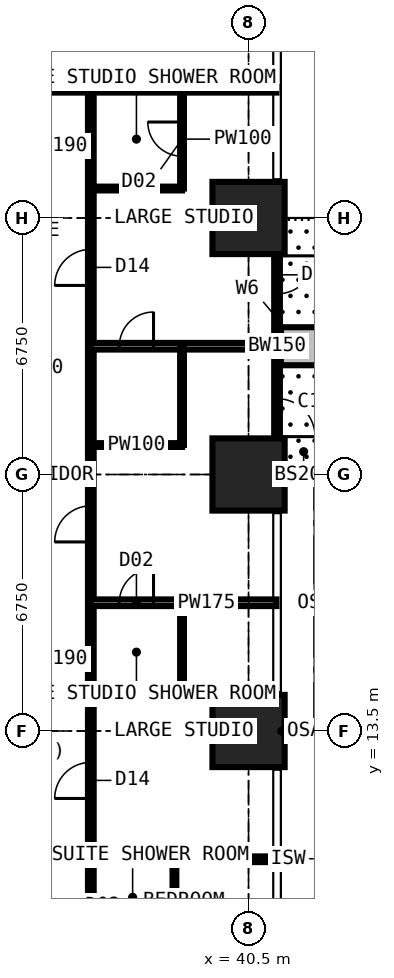
"""IFC4 building model, lengths in metres.
Left out: names, types, materials, properties, quantities, classifications, styles, units other than length and angle.
Written with IfcOpenShell. Run it as: python <this file> out.ifc"""

import sys

from ifc_helpers import new_model, si_unit, direction, frame, frame_2d, origin, origin_2d, place, context, subcontext, project, spatial, rectangle, extrude, element, fill, save


model = new_model("IFC4")
c1 = context("Model", 3, precision=1e-05, world=origin(), true_north=direction((0.0, 1.0)))
c2 = subcontext(c1, "Body", "Model", "MODEL_VIEW")
j1 = project(units=[si_unit("LENGTHUNIT", "METRE"), si_unit("PLANEANGLEUNIT", "RADIAN")], contexts=[c1])
p1 = place(None, origin())
s1 = spatial("IfcSite", under=j1, at=p1, CompositionType="ELEMENT")
p2 = place(p1, origin())
s2 = spatial("IfcBuilding", under=s1, at=p2, CompositionType="ELEMENT")
p3 = place(p2, frame((0.0, 0.0, 43.2)))
s3 = spatial("IfcBuildingStorey", under=s2, at=p3, CompositionType="ELEMENT", Elevation=43.2)
for number, where, z_axis, x_axis in (
    (1, (40.5, 13.5, 0.0), (0.0, 0.0, 1.0), (1.0, 0.0, 0.0)),
    (2, (40.5, 20.25, 0.0), (0.0, 0.0, 1.0), (1.0, 0.0, 0.0)),
    (3, (40.5, 27.0, 0.0), (0.0, 0.0, 1.0), (1.0, 0.0, 0.0)),
):
    element("IfcColumn", number, at=place(p3, frame(where, z_axis=z_axis, x_axis=x_axis)), inside=s3, PredefinedType="COLUMN", context=c2, shape_type="SweptSolid", body=[
        extrude(rectangle(XDim=1.9, YDim=1.9, at=origin_2d()), origin(), (0.0, 0.0, 1.0), 3.6),
    ])
p4 = place(p3, frame((41.25, 27.0, 0.0), z_axis=(0.0, 0.0, 1.0), x_axis=(0.0, -1.0, 0.0)))
e4 = element("IfcWall", 4, at=p4, inside=s3, PredefinedType="SOLIDWALL", context=c2, shape_type="SweptSolid", body=[
    extrude(rectangle(XDim=6.75, YDim=0.15, at=frame_2d((3.375, 0.0))), origin(), (0.0, 0.0, 1.0), 3.375),
])
p5 = place(p4, frame((0.996, 0.0, 0.0)))
e5 = element("IfcOpeningElement", 5, at=p5, cuts=e4, PredefinedType="OPENING", context=c2, shape_type="SweptSolid", body=[
    extrude(rectangle(XDim=1.0, YDim=2.2, at=frame_2d((0.5, 1.1))), frame((0.0, 0.085, 0.0), z_axis=(0.0, -1.0, 0.0), x_axis=(1.0, 0.0, 0.0)), (0.0, 0.0, 1.0), 0.17),
])
p6 = place(p4, frame((2.042, 0.0, 0.9)))
e6 = element("IfcOpeningElement", 6, at=p6, cuts=e4, PredefinedType="OPENING", context=c2, shape_type="SweptSolid", body=[
    extrude(rectangle(XDim=1.2, YDim=1.8, at=frame_2d((0.6, 0.9))), frame((0.0, 0.085, 0.0), z_axis=(0.0, -1.0, 0.0), x_axis=(1.0, 0.0, 0.0)), (0.0, 0.0, 1.0), 0.17),
])
p7 = place(p4, frame((4.754, 0.0, 0.0)))
e7 = element("IfcOpeningElement", 7, at=p7, cuts=e4, PredefinedType="OPENING", context=c2, shape_type="SweptSolid", body=[
    extrude(rectangle(XDim=1.0, YDim=2.2, at=frame_2d((0.5, 1.1))), frame((0.0, 0.085, 0.0), z_axis=(0.0, -1.0, 0.0), x_axis=(1.0, 0.0, 0.0)), (0.0, 0.0, 1.0), 0.17),
])
p8 = place(p4, frame((3.508, 0.0, 0.9)))
e8 = element("IfcOpeningElement", 8, at=p8, cuts=e4, PredefinedType="OPENING", context=c2, shape_type="SweptSolid", body=[
    extrude(rectangle(XDim=1.2, YDim=1.8, at=frame_2d((0.6, 0.9))), frame((0.0, 0.085, 0.0), z_axis=(0.0, -1.0, 0.0), x_axis=(1.0, 0.0, 0.0)), (0.0, 0.0, 1.0), 0.17),
])
p9 = place(p3, frame((41.35, 23.625, 0.0), z_axis=(0.0, 0.0, 1.0), x_axis=(1.0, 0.0, 0.0)))
e9 = element("IfcWall", 9, at=p9, inside=s3, PredefinedType="USERDEFINED", context=c2, shape_type="SweptSolid", body=[
    extrude(rectangle(XDim=2.2, YDim=1.0, at=frame_2d((1.1, 0.0))), origin(), (0.0, 0.0, 1.0), 0.9),
])
p10 = place(p3, frame((30.375, 10.125, 0.0), z_axis=(0.0, 0.0, 1.0), x_axis=(1.0, 0.0, 0.0)))
e10 = element("IfcWall", 10, at=p10, inside=s3, PredefinedType="PARTITIONING", context=c2, shape_type="SweptSolid", body=[
    extrude(rectangle(XDim=10.859, YDim=0.15, at=frame_2d((5.429, 0.0))), origin(), (0.0, 0.0, 1.0), 3.375),
])
p11 = place(p10, frame((2.5, 0.0, 0.0)))
e11 = element("IfcOpeningElement", 11, at=p11, cuts=e10, PredefinedType="OPENING", context=c2, shape_type="SweptSolid", body=[
    extrude(rectangle(XDim=1.0, YDim=2.2, at=frame_2d((0.5, 1.1))), frame((0.0, 0.085, 0.0), z_axis=(0.0, -1.0, 0.0), x_axis=(1.0, 0.0, 0.0)), (0.0, 0.0, 1.0), 0.17),
])
p12 = place(p3, frame((30.375, 30.375, 0.0), z_axis=(0.0, 0.0, 1.0), x_axis=(1.0, 0.0, 0.0)))
e12 = element("IfcWall", 12, at=p12, inside=s3, PredefinedType="PARTITIONING", context=c2, shape_type="SweptSolid", body=[
    extrude(rectangle(XDim=10.859, YDim=0.15, at=frame_2d((5.429, 0.0))), origin(), (0.0, 0.0, 1.0), 3.375),
])
p13 = place(p3, frame((36.35, 6.75, 0.0), z_axis=(0.0, 0.0, 1.0), x_axis=(0.0, 1.0, 0.0)))
e13 = element("IfcWall", 13, at=p13, inside=s3, PredefinedType="PARTITIONING", context=c2, shape_type="SweptSolid", body=[
    extrude(rectangle(XDim=23.625, YDim=0.15, at=frame_2d((11.812, 0.0))), origin(), (0.0, 0.0, 1.0), 3.375),
])
p14 = place(p13, frame((0.2, 0.0, 0.0)))
e14 = element("IfcOpeningElement", 14, at=p14, cuts=e13, PredefinedType="OPENING", context=c2, shape_type="SweptSolid", body=[
    extrude(rectangle(XDim=0.95, YDim=2.2, at=frame_2d((0.475, 1.1))), frame((0.0, 0.085, 0.0), z_axis=(0.0, -1.0, 0.0), x_axis=(1.0, 0.0, 0.0)), (0.0, 0.0, 1.0), 0.17),
])
p15 = place(p13, frame((18.475, 0.0, 0.0)))
e15 = element("IfcOpeningElement", 15, at=p15, cuts=e13, PredefinedType="OPENING", context=c2, shape_type="SweptSolid", body=[
    extrude(rectangle(XDim=0.95, YDim=2.2, at=frame_2d((0.475, 1.1))), frame((0.0, 0.085, 0.0), z_axis=(0.0, -1.0, 0.0), x_axis=(1.0, 0.0, 0.0)), (0.0, 0.0, 1.0), 0.17),
])
p16 = place(p13, frame((11.725, 0.0, 0.0)))
e16 = element("IfcOpeningElement", 16, at=p16, cuts=e13, PredefinedType="OPENING", context=c2, shape_type="SweptSolid", body=[
    extrude(rectangle(XDim=0.95, YDim=2.2, at=frame_2d((0.475, 1.1))), frame((0.0, 0.085, 0.0), z_axis=(0.0, -1.0, 0.0), x_axis=(1.0, 0.0, 0.0)), (0.0, 0.0, 1.0), 0.17),
])
p17 = place(p13, frame((4.975, 0.0, 0.0)))
e17 = element("IfcOpeningElement", 17, at=p17, cuts=e13, PredefinedType="OPENING", context=c2, shape_type="SweptSolid", body=[
    extrude(rectangle(XDim=0.95, YDim=2.2, at=frame_2d((0.475, 1.1))), frame((0.0, 0.085, 0.0), z_axis=(0.0, -1.0, 0.0), x_axis=(1.0, 0.0, 0.0)), (0.0, 0.0, 1.0), 0.17),
])
p18 = place(p3, frame((36.35, 14.275, 0.0), z_axis=(0.0, 0.0, 1.0), x_axis=(1.0, 0.0, 0.0)))
e18 = element("IfcWall", 18, at=p18, inside=s3, PredefinedType="PARTITIONING", context=c2, shape_type="SweptSolid", body=[
    extrude(rectangle(XDim=2.4, YDim=0.1, at=frame_2d((1.2, 0.0))), origin(), (0.0, 0.0, 1.0), 3.375),
])
p19 = place(p3, frame((36.35, 16.875, 0.0), z_axis=(0.0, 0.0, 1.0), x_axis=(1.0, 0.0, 0.0)))
e19 = element("IfcWall", 19, at=p19, inside=s3, PredefinedType="PARTITIONING", context=c2, shape_type="SweptSolid", body=[
    extrude(rectangle(XDim=4.884, YDim=0.175, at=frame_2d((2.442, 0.0))), origin(), (0.0, 0.0, 1.0), 3.375),
])
p20 = place(p19, frame((0.75, 0.0, 0.0)))
e20 = element("IfcOpeningElement", 20, at=p20, cuts=e19, PredefinedType="OPENING", context=c2, shape_type="SweptSolid", body=[
    extrude(rectangle(XDim=0.9, YDim=2.2, at=frame_2d((0.45, 1.1))), frame((0.0, 0.097, 0.0), z_axis=(0.0, -1.0, 0.0), x_axis=(1.0, 0.0, 0.0)), (0.0, 0.0, 1.0), 0.195),
])
p21 = place(p3, frame((36.35, 21.025, 0.0), z_axis=(0.0, 0.0, 1.0), x_axis=(1.0, 0.0, 0.0)))
e21 = element("IfcWall", 21, at=p21, inside=s3, PredefinedType="PARTITIONING", context=c2, shape_type="SweptSolid", body=[
    extrude(rectangle(XDim=2.4, YDim=0.1, at=frame_2d((1.2, 0.0))), origin(), (0.0, 0.0, 1.0), 3.375),
])
p22 = place(p3, frame((36.35, 23.625, 0.0), z_axis=(0.0, 0.0, 1.0), x_axis=(1.0, 0.0, 0.0)))
e22 = element("IfcWall", 22, at=p22, inside=s3, PredefinedType="PARTITIONING", context=c2, shape_type="SweptSolid", body=[
    extrude(rectangle(XDim=4.884, YDim=0.175, at=frame_2d((2.442, 0.0))), origin(), (0.0, 0.0, 1.0), 3.375),
])
p23 = place(p22, frame((0.75, 0.0, 0.0)))
e23 = element("IfcOpeningElement", 23, at=p23, cuts=e22, PredefinedType="OPENING", context=c2, shape_type="SweptSolid", body=[
    extrude(rectangle(XDim=0.9, YDim=2.2, at=frame_2d((0.45, 1.1))), frame((0.0, 0.097, 0.0), z_axis=(0.0, -1.0, 0.0), x_axis=(1.0, 0.0, 0.0)), (0.0, 0.0, 1.0), 0.195),
])
p24 = place(p3, frame((36.35, 27.775, 0.0), z_axis=(0.0, 0.0, 1.0), x_axis=(1.0, 0.0, 0.0)))
e24 = element("IfcWall", 24, at=p24, inside=s3, PredefinedType="PARTITIONING", context=c2, shape_type="SweptSolid", body=[
    extrude(rectangle(XDim=2.4, YDim=0.1, at=frame_2d((1.2, 0.0))), origin(), (0.0, 0.0, 1.0), 3.375),
])
p25 = place(p3, frame((38.55, 8.125, 0.0), z_axis=(0.0, 0.0, 1.0), x_axis=(0.0, 1.0, 0.0)))
e25 = element("IfcWall", 25, at=p25, inside=s3, PredefinedType="PARTITIONING", context=c2, shape_type="SweptSolid", body=[
    extrude(rectangle(XDim=2.0, YDim=0.1, at=frame_2d((1.0, 0.0))), origin(), (0.0, 0.0, 1.0), 3.375),
])
for number, where, z_axis, x_axis in (
    (26, (38.75, 14.275, 0.0), (0.0, 0.0, 1.0), (0.0, 1.0, 0.0)),
    (27, (38.75, 21.025, 0.0), (0.0, 0.0, 1.0), (0.0, 1.0, 0.0)),
):
    element("IfcWall", number, at=place(p3, frame(where, z_axis=z_axis, x_axis=x_axis)), inside=s3, PredefinedType="PARTITIONING", context=c2, shape_type="SweptSolid", body=[
        extrude(rectangle(XDim=2.6, YDim=0.1, at=frame_2d((1.3, 0.0))), origin(), (0.0, 0.0, 1.0), 3.375),
    ])
p26 = place(p3, frame((38.75, 27.775, 0.0), z_axis=(0.0, 0.0, 1.0), x_axis=(0.0, 1.0, 0.0)))
e28 = element("IfcWall", 28, at=p26, inside=s3, PredefinedType="PARTITIONING", context=c2, shape_type="SweptSolid", body=[
    extrude(rectangle(XDim=2.6, YDim=0.1, at=frame_2d((1.3, 0.0))), origin(), (0.0, 0.0, 1.0), 3.375),
])
p27 = place(p26, frame((0.85, 0.0, 0.0)))
e29 = element("IfcOpeningElement", 29, at=p27, cuts=e28, PredefinedType="OPENING", context=c2, shape_type="SweptSolid", body=[
    extrude(rectangle(XDim=0.9, YDim=2.2, at=frame_2d((0.45, 1.1))), frame((0.0, 0.06, 0.0), z_axis=(0.0, -1.0, 0.0), x_axis=(1.0, 0.0, 0.0)), (0.0, 0.0, 1.0), 0.12),
])
p28 = place(p5, origin())
e30 = element("IfcDoor", 30, at=p28, inside=s3, OperationType="SINGLE_SWING_LEFT", PredefinedType="DOOR", context=c2, shape_type="SweptSolid", body=[
    extrude(rectangle(XDim=1.0, YDim=2.2, at=frame_2d((0.5, 1.1))), frame((0.0, 0.025, 0.0), z_axis=(0.0, -1.0, 0.0), x_axis=(1.0, 0.0, 0.0)), (0.0, 0.0, 1.0), 0.05),
])
fill(e5, e30)
p29 = place(p6, origin())
e31 = element("IfcWindow", 31, at=p29, inside=s3, PartitioningType="SINGLE_PANEL", PredefinedType="WINDOW", context=c2, shape_type="SweptSolid", body=[
    extrude(rectangle(XDim=1.2, YDim=1.8, at=frame_2d((0.6, 0.9))), frame((0.0, 0.03, 0.0), z_axis=(0.0, -1.0, 0.0), x_axis=(1.0, 0.0, 0.0)), (0.0, 0.0, 1.0), 0.06),
])
fill(e6, e31)
p30 = place(p7, origin())
e32 = element("IfcDoor", 32, at=p30, inside=s3, OperationType="SINGLE_SWING_RIGHT", PredefinedType="DOOR", context=c2, shape_type="SweptSolid", body=[
    extrude(rectangle(XDim=1.0, YDim=2.2, at=frame_2d((0.5, 1.1))), frame((0.0, 0.025, 0.0), z_axis=(0.0, -1.0, 0.0), x_axis=(1.0, 0.0, 0.0)), (0.0, 0.0, 1.0), 0.05),
])
fill(e7, e32)
p31 = place(p8, origin())
e33 = element("IfcWindow", 33, at=p31, inside=s3, PartitioningType="SINGLE_PANEL", PredefinedType="WINDOW", context=c2, shape_type="SweptSolid", body=[
    extrude(rectangle(XDim=1.2, YDim=1.8, at=frame_2d((0.6, 0.9))), frame((0.0, 0.03, 0.0), z_axis=(0.0, -1.0, 0.0), x_axis=(1.0, 0.0, 0.0)), (0.0, 0.0, 1.0), 0.06),
])
fill(e8, e33)
p32 = place(p15, origin())
e34 = element("IfcDoor", 34, at=p32, inside=s3, OperationType="SINGLE_SWING_LEFT", PredefinedType="DOOR", context=c2, shape_type="SweptSolid", body=[
    extrude(rectangle(XDim=0.95, YDim=2.2, at=frame_2d((0.475, 1.1))), frame((0.0, 0.025, 0.0), z_axis=(0.0, -1.0, 0.0), x_axis=(1.0, 0.0, 0.0)), (0.0, 0.0, 1.0), 0.05),
])
fill(e15, e34)
p33 = place(p27, origin())
e35 = element("IfcDoor", 35, at=p33, inside=s3, OperationType="SINGLE_SWING_RIGHT", PredefinedType="DOOR", context=c2, shape_type="SweptSolid", body=[
    extrude(rectangle(XDim=0.9, YDim=2.2, at=frame_2d((0.45, 1.1))), frame((0.0, 0.025, 0.0), z_axis=(0.0, -1.0, 0.0), x_axis=(1.0, 0.0, 0.0)), (0.0, 0.0, 1.0), 0.05),
])
fill(e29, e35)
p34 = place(p16, origin())
e36 = element("IfcDoor", 36, at=p34, inside=s3, OperationType="SINGLE_SWING_LEFT", PredefinedType="DOOR", context=c2, shape_type="SweptSolid", body=[
    extrude(rectangle(XDim=0.95, YDim=2.2, at=frame_2d((0.475, 1.1))), frame((0.0, 0.025, 0.0), z_axis=(0.0, -1.0, 0.0), x_axis=(1.0, 0.0, 0.0)), (0.0, 0.0, 1.0), 0.05),
])
fill(e16, e36)
p35 = place(p23, origin())
e37 = element("IfcDoor", 37, at=p35, inside=s3, OperationType="SINGLE_SWING_RIGHT", PredefinedType="DOOR", context=c2, shape_type="SweptSolid", body=[
    extrude(rectangle(XDim=0.9, YDim=2.2, at=frame_2d((0.45, 1.1))), frame((0.0, 0.025, 0.0), z_axis=(0.0, -1.0, 0.0), x_axis=(1.0, 0.0, 0.0)), (0.0, 0.0, 1.0), 0.05),
])
fill(e23, e37)
p36 = place(p17, origin())
e38 = element("IfcDoor", 38, at=p36, inside=s3, OperationType="SINGLE_SWING_LEFT", PredefinedType="DOOR", context=c2, shape_type="SweptSolid", body=[
    extrude(rectangle(XDim=0.95, YDim=2.2, at=frame_2d((0.475, 1.1))), frame((0.0, 0.025, 0.0), z_axis=(0.0, -1.0, 0.0), x_axis=(1.0, 0.0, 0.0)), (0.0, 0.0, 1.0), 0.05),
])
fill(e17, e38)
p37 = place(p20, origin())
e39 = element("IfcDoor", 39, at=p37, inside=s3, OperationType="SINGLE_SWING_RIGHT", PredefinedType="DOOR", context=c2, shape_type="SweptSolid", body=[
    extrude(rectangle(XDim=0.9, YDim=2.2, at=frame_2d((0.45, 1.1))), frame((0.0, 0.025, 0.0), z_axis=(0.0, -1.0, 0.0), x_axis=(1.0, 0.0, 0.0)), (0.0, 0.0, 1.0), 0.05),
])
fill(e20, e39)
save(model, sys.argv[1])
